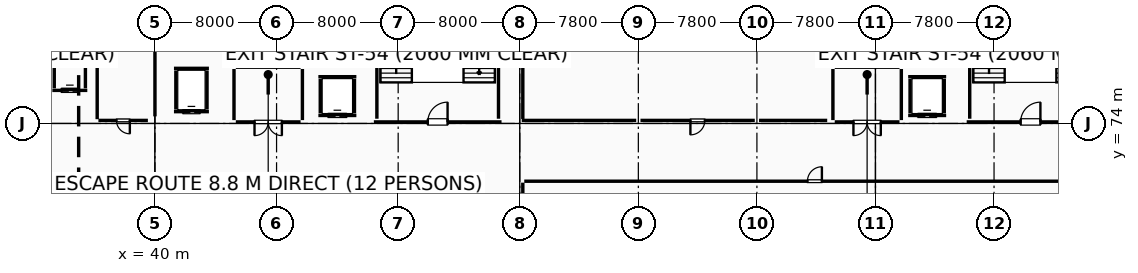
"""IFC4 building model, lengths in metres.
Left out: names, types, materials, properties, quantities, classifications, styles, units other than length and angle.
Written with IfcOpenShell. Run it as: python <this file> out.ifc"""

import sys

from ifc_helpers import new_model, si_unit, direction, frame, frame_2d, origin, origin_2d, place, context, subcontext, project, spatial, rectangle, i_section, extrude, element, fill, save


model = new_model("IFC4")
c1 = context("Model", 3, precision=1e-05, world=origin(), true_north=direction((0.0, 1.0)))
c2 = subcontext(c1, "Body", "Model", "MODEL_VIEW")
j1 = project(units=[si_unit("LENGTHUNIT", "METRE"), si_unit("PLANEANGLEUNIT", "RADIAN")], contexts=[c1])
p1 = place(None, origin())
s1 = spatial("IfcSite", under=j1, at=p1, CompositionType="ELEMENT")
p2 = place(p1, origin())
s2 = spatial("IfcBuilding", under=s1, at=p2, CompositionType="ELEMENT")
p3 = place(p2, origin())
s3 = spatial("IfcBuildingStorey", under=s2, at=p3, CompositionType="ELEMENT", Elevation=0.0)
p4 = place(p3, frame((40.0, 74.0, 0.0), z_axis=(0.0, 0.0, 1.0), x_axis=(1.0, 0.0, 0.0)))
e1 = element("IfcColumn", 1, at=p4, inside=s3, PredefinedType="COLUMN", context=c2, shape_type="SweptSolid", body=[
    extrude(rectangle(XDim=0.9, YDim=0.9, at=origin_2d()), origin(), (0.0, 0.0, 1.0), 5.4),
])
for number, where, z_axis, x_axis in (
    (2, (64.0, 74.0, 0.0), (0.0, 0.0, 1.0), (1.0, 0.0, 0.0)),
    (3, (71.8, 74.0, 0.0), (0.0, 0.0, 1.0), (1.0, 0.0, 0.0)),
    (4, (79.6, 74.0, 0.0), (0.0, 0.0, 1.0), (1.0, 0.0, 0.0)),
):
    element("IfcColumn", number, at=place(p3, frame(where, z_axis=z_axis, x_axis=x_axis)), inside=s3, PredefinedType="COLUMN", context=c2, shape_type="SweptSolid", body=[
        extrude(i_section(OverallWidth=0.25, OverallDepth=0.45, WebThickness=0.011, FlangeThickness=0.014, FilletRadius=0.015, at=origin_2d()), origin(), (0.0, 0.0, 1.0), 5.4),
    ])
for number, where, z_axis, x_axis in (
    (5, (40.0, 69.8, 0.0), (0.0, 0.0, 1.0), (1.0, 0.0, 0.0)),
    (6, (54.0, 69.8, 0.0), (0.0, 0.0, 1.0), (1.0, 0.0, 0.0)),
):
    element("IfcColumn", number, at=place(p3, frame(where, z_axis=z_axis, x_axis=x_axis)), inside=s3, PredefinedType="COLUMN", context=c2, shape_type="SweptSolid", body=[
        extrude(i_section(OverallWidth=0.25, OverallDepth=0.35, WebThickness=0.01, FlangeThickness=0.012, FilletRadius=0.012, at=origin_2d()), origin(), (0.0, 0.0, 1.0), 5.4),
    ])
p5 = place(p3, frame((39.84, 69.617, 0.0), z_axis=(0.0, 0.0, 1.0), x_axis=(0.0, -1.0, 0.0)))
e7 = element("IfcWall", 7, at=p5, inside=s3, PredefinedType="STANDARD", context=c2, shape_type="SweptSolid", body=[
    extrude(rectangle(XDim=4.17, YDim=0.28, at=frame_2d((2.085, 0.0))), origin(), (0.0, 0.0, 1.0), 4.505),
])
p6 = place(p5, frame((0.667, 0.0, 0.95)))
e8 = element("IfcOpeningElement", 8, at=p6, cuts=e7, PredefinedType="OPENING", context=c2, shape_type="SweptSolid", body=[
    extrude(rectangle(XDim=2.4, YDim=1.5, at=frame_2d((1.2, 0.75))), frame((0.0, 0.15, 0.0), z_axis=(0.0, -1.0, 0.0), x_axis=(1.0, 0.0, 0.0)), (0.0, 0.0, 1.0), 0.3),
])
p7 = place(p3, frame((54.15, 65.883, 0.0), z_axis=(0.0, 0.0, 1.0), x_axis=(0.0, 1.0, 0.0)))
e9 = element("IfcWall", 9, at=p7, inside=s3, PredefinedType="ELEMENTEDWALL", context=c2, shape_type="SweptSolid", body=[
    extrude(rectangle(XDim=3.734, YDim=0.26, at=frame_2d((1.867, 0.0))), origin(), (0.0, 0.0, 1.0), 3.675),
])
p8 = place(p7, frame((1.417, 0.0, 0.95)))
e10 = element("IfcOpeningElement", 10, at=p8, cuts=e9, PredefinedType="OPENING", context=c2, shape_type="SweptSolid", body=[
    extrude(rectangle(XDim=0.9, YDim=1.8, at=frame_2d((0.45, 0.9))), frame((0.0, 0.14, 0.0), z_axis=(0.0, -1.0, 0.0), x_axis=(1.0, 0.0, 0.0)), (0.0, 0.0, 1.0), 0.28),
])
p9 = place(p3, frame((54.4, 74.1, 0.0), z_axis=(0.0, 0.0, 1.0), x_axis=(1.0, 0.0, 0.0)))
e11 = element("IfcWall", 11, at=p9, inside=s3, PredefinedType="SHEAR", context=c2, shape_type="SweptSolid", body=[
    extrude(rectangle(XDim=8.4, YDim=0.4, at=frame_2d((4.2, 0.0))), origin(), (0.0, 0.0, 1.0), 5.12),
])
p10 = place(p9, frame((3.55, 0.0, 0.0)))
e12 = element("IfcOpeningElement", 12, at=p10, cuts=e11, PredefinedType="OPENING", context=c2, shape_type="SweptSolid", body=[
    extrude(rectangle(XDim=1.3, YDim=2.15, at=frame_2d((0.65, 1.075))), frame((0.0, 0.21, 0.0), z_axis=(0.0, -1.0, 0.0), x_axis=(1.0, 0.0, 0.0)), (0.0, 0.0, 1.0), 0.42),
])
for number, where, z_axis, x_axis in (
    (13, (62.6, 74.31, 0.0), (0.0, 0.0, 1.0), (0.0, 1.0, 0.0)),
    (14, (54.6, 82.69, 0.0), (0.0, 0.0, 1.0), (0.0, -1.0, 0.0)),
):
    element("IfcWall", number, at=place(p3, frame(where, z_axis=z_axis, x_axis=x_axis)), inside=s3, PredefinedType="SHEAR", context=c2, shape_type="SweptSolid", body=[
        extrude(rectangle(XDim=8.38, YDim=0.4, at=frame_2d((4.19, 0.0))), origin(), (0.0, 0.0, 1.0), 5.12),
    ])
p11 = place(p3, frame((50.75, 74.525, 0.0), z_axis=(0.0, 0.0, 1.0), x_axis=(1.0, 0.0, 0.0)))
e15 = element("IfcWall", 15, at=p11, inside=s3, PredefinedType="STANDARD", context=c2, shape_type="SweptSolid", body=[
    extrude(rectangle(XDim=2.5, YDim=0.25, at=frame_2d((1.25, 0.0))), origin(), (0.0, 0.0, 1.0), 5.11),
])
p12 = place(p11, frame((0.65, 0.0, 0.0)))
e16 = element("IfcOpeningElement", 16, at=p12, cuts=e15, PredefinedType="OPENING", context=c2, shape_type="SweptSolid", body=[
    extrude(rectangle(XDim=1.2, YDim=2.05, at=frame_2d((0.6, 1.025))), frame((0.0, 0.135, 0.0), z_axis=(0.0, -1.0, 0.0), x_axis=(1.0, 0.0, 0.0)), (0.0, 0.0, 1.0), 0.27),
])
p13 = place(p3, frame((53.25, 77.075, 0.0), z_axis=(0.0, 0.0, 1.0), x_axis=(-1.0, 0.0, 0.0)))
e17 = element("IfcWall", 17, at=p13, inside=s3, PredefinedType="STANDARD", context=c2, shape_type="SweptSolid", body=[
    extrude(rectangle(XDim=2.5, YDim=0.25, at=frame_2d((1.25, 0.0))), origin(), (0.0, 0.0, 1.0), 5.11),
])
for number, where, z_axis, x_axis in (
    (18, (53.125, 74.66, 0.0), (0.0, 0.0, 1.0), (0.0, 1.0, 0.0)),
    (19, (50.875, 76.94, 0.0), (0.0, 0.0, 1.0), (0.0, -1.0, 0.0)),
):
    element("IfcWall", number, at=place(p3, frame(where, z_axis=z_axis, x_axis=x_axis)), inside=s3, PredefinedType="STANDARD", context=c2, shape_type="SweptSolid", body=[
        extrude(rectangle(XDim=2.28, YDim=0.25, at=frame_2d((1.14, 0.0))), origin(), (0.0, 0.0, 1.0), 5.11),
    ])
p14 = place(p3, frame((41.25, 74.775, 0.0), z_axis=(0.0, 0.0, 1.0), x_axis=(1.0, 0.0, 0.0)))
e20 = element("IfcWall", 20, at=p14, inside=s3, PredefinedType="STANDARD", context=c2, shape_type="SweptSolid", body=[
    extrude(rectangle(XDim=2.3, YDim=0.25, at=frame_2d((1.15, 0.0))), origin(), (0.0, 0.0, 1.0), 5.11),
])
p15 = place(p14, frame((0.6, 0.0, 0.0)))
e21 = element("IfcOpeningElement", 21, at=p15, cuts=e20, PredefinedType="OPENING", context=c2, shape_type="SweptSolid", body=[
    extrude(rectangle(XDim=1.1, YDim=2.15, at=frame_2d((0.55, 1.075))), frame((0.0, 0.135, 0.0), z_axis=(0.0, -1.0, 0.0), x_axis=(1.0, 0.0, 0.0)), (0.0, 0.0, 1.0), 0.27),
])
p16 = place(p3, frame((43.55, 77.625, 0.0), z_axis=(0.0, 0.0, 1.0), x_axis=(-1.0, 0.0, 0.0)))
e22 = element("IfcWall", 22, at=p16, inside=s3, PredefinedType="STANDARD", context=c2, shape_type="SweptSolid", body=[
    extrude(rectangle(XDim=2.3, YDim=0.25, at=frame_2d((1.15, 0.0))), origin(), (0.0, 0.0, 1.0), 5.11),
])
for number, where, z_axis, x_axis in (
    (23, (43.425, 74.91, 0.0), (0.0, 0.0, 1.0), (0.0, 1.0, 0.0)),
    (24, (41.375, 77.49, 0.0), (0.0, 0.0, 1.0), (0.0, -1.0, 0.0)),
):
    element("IfcWall", number, at=place(p3, frame(where, z_axis=z_axis, x_axis=x_axis)), inside=s3, PredefinedType="STANDARD", context=c2, shape_type="SweptSolid", body=[
        extrude(rectangle(XDim=2.58, YDim=0.25, at=frame_2d((1.29, 0.0))), origin(), (0.0, 0.0, 1.0), 5.11),
    ])
p17 = place(p3, frame((93.4, 74.1, 0.0), z_axis=(0.0, 0.0, 1.0), x_axis=(1.0, 0.0, 0.0)))
e25 = element("IfcWall", 25, at=p17, inside=s3, PredefinedType="SHEAR", context=c2, shape_type="SweptSolid", body=[
    extrude(rectangle(XDim=8.4, YDim=0.4, at=frame_2d((4.2, 0.0))), origin(), (0.0, 0.0, 1.0), 5.12),
])
p18 = place(p17, frame((3.55, 0.0, 0.0)))
e26 = element("IfcOpeningElement", 26, at=p18, cuts=e25, PredefinedType="OPENING", context=c2, shape_type="SweptSolid", body=[
    extrude(rectangle(XDim=1.3, YDim=2.15, at=frame_2d((0.65, 1.075))), frame((0.0, 0.21, 0.0), z_axis=(0.0, -1.0, 0.0), x_axis=(1.0, 0.0, 0.0)), (0.0, 0.0, 1.0), 0.42),
])
p19 = place(p3, frame((93.6, 82.69, 0.0), z_axis=(0.0, 0.0, 1.0), x_axis=(0.0, -1.0, 0.0)))
e27 = element("IfcWall", 27, at=p19, inside=s3, PredefinedType="SHEAR", context=c2, shape_type="SweptSolid", body=[
    extrude(rectangle(XDim=8.38, YDim=0.4, at=frame_2d((4.19, 0.0))), origin(), (0.0, 0.0, 1.0), 5.12),
])
p20 = place(p3, frame((89.55, 74.525, 0.0), z_axis=(0.0, 0.0, 1.0), x_axis=(1.0, 0.0, 0.0)))
e28 = element("IfcWall", 28, at=p20, inside=s3, PredefinedType="STANDARD", context=c2, shape_type="SweptSolid", body=[
    extrude(rectangle(XDim=2.5, YDim=0.25, at=frame_2d((1.25, 0.0))), origin(), (0.0, 0.0, 1.0), 5.11),
])
p21 = place(p20, frame((0.65, 0.0, 0.0)))
e29 = element("IfcOpeningElement", 29, at=p21, cuts=e28, PredefinedType="OPENING", context=c2, shape_type="SweptSolid", body=[
    extrude(rectangle(XDim=1.2, YDim=2.05, at=frame_2d((0.6, 1.025))), frame((0.0, 0.135, 0.0), z_axis=(0.0, -1.0, 0.0), x_axis=(1.0, 0.0, 0.0)), (0.0, 0.0, 1.0), 0.27),
])
p22 = place(p3, frame((92.05, 77.075, 0.0), z_axis=(0.0, 0.0, 1.0), x_axis=(-1.0, 0.0, 0.0)))
e30 = element("IfcWall", 30, at=p22, inside=s3, PredefinedType="STANDARD", context=c2, shape_type="SweptSolid", body=[
    extrude(rectangle(XDim=2.5, YDim=0.25, at=frame_2d((1.25, 0.0))), origin(), (0.0, 0.0, 1.0), 5.11),
])
for number, where, z_axis, x_axis in (
    (31, (91.925, 74.66, 0.0), (0.0, 0.0, 1.0), (0.0, 1.0, 0.0)),
    (32, (89.675, 76.94, 0.0), (0.0, 0.0, 1.0), (0.0, -1.0, 0.0)),
):
    element("IfcWall", number, at=place(p3, frame(where, z_axis=z_axis, x_axis=x_axis)), inside=s3, PredefinedType="STANDARD", context=c2, shape_type="SweptSolid", body=[
        extrude(rectangle(XDim=2.28, YDim=0.25, at=frame_2d((1.14, 0.0))), origin(), (0.0, 0.0, 1.0), 5.11),
    ])
p23 = place(p3, frame((85.65, 78.775, 0.0), z_axis=(0.0, 0.0, 1.0), x_axis=(1.0, 0.0, 0.0)))
e33 = element("IfcWall", 33, at=p23, inside=s3, PredefinedType="STANDARD", context=c2, shape_type="SweptSolid", body=[
    extrude(rectangle(XDim=2.3, YDim=0.25, at=frame_2d((1.15, 0.0))), origin(), (0.0, 0.0, 1.0), 5.11),
])
p24 = place(p3, frame((33.25, 76.175, 0.0), z_axis=(0.0, 0.0, 1.0), x_axis=(1.0, 0.0, 0.0)))
e34 = element("IfcWall", 34, at=p24, inside=s3, PredefinedType="STANDARD", context=c2, shape_type="SweptSolid", body=[
    extrude(rectangle(XDim=2.3, YDim=0.25, at=frame_2d((1.15, 0.0))), origin(), (0.0, 0.0, 1.0), 5.11),
])
p25 = place(p24, frame((0.6, 0.0, 0.0)))
e35 = element("IfcOpeningElement", 35, at=p25, cuts=e34, PredefinedType="OPENING", context=c2, shape_type="SweptSolid", body=[
    extrude(rectangle(XDim=1.1, YDim=2.15, at=frame_2d((0.55, 1.075))), frame((0.0, 0.135, 0.0), z_axis=(0.0, -1.0, 0.0), x_axis=(1.0, 0.0, 0.0)), (0.0, 0.0, 1.0), 0.27),
])
for number, where, z_axis, x_axis in (
    (36, (35.425, 76.31, 0.0), (0.0, 0.0, 1.0), (0.0, 1.0, 0.0)),
    (37, (33.375, 78.89, 0.0), (0.0, 0.0, 1.0), (0.0, -1.0, 0.0)),
):
    element("IfcWall", number, at=place(p3, frame(where, z_axis=z_axis, x_axis=x_axis)), inside=s3, PredefinedType="STANDARD", context=c2, shape_type="SweptSolid", body=[
        extrude(rectangle(XDim=2.58, YDim=0.25, at=frame_2d((1.29, 0.0))), origin(), (0.0, 0.0, 1.0), 5.11),
    ])
p26 = place(p3, frame((45.2, 74.22, 0.0), z_axis=(0.0, 0.0, 1.0), x_axis=(0.0, 1.0, 0.0)))
e38 = element("IfcWall", 38, at=p26, inside=s3, PredefinedType="PARTITIONING", context=c2, shape_type="SweptSolid", body=[
    extrude(rectangle(XDim=3.36, YDim=0.2, at=frame_2d((1.68, 0.0))), origin(), (0.0, 0.0, 1.0), 5.11),
])
p27 = place(p3, frame((45.32, 77.7, 0.0), z_axis=(0.0, 0.0, 1.0), x_axis=(1.0, 0.0, 0.0)))
e39 = element("IfcWall", 39, at=p27, inside=s3, PredefinedType="PARTITIONING", context=c2, shape_type="SweptSolid", body=[
    extrude(rectangle(XDim=4.26, YDim=0.2, at=frame_2d((2.13, 0.0))), origin(), (0.0, 0.0, 1.0), 5.11),
])
p28 = place(p3, frame((49.7, 77.58, 0.0), z_axis=(0.0, 0.0, 1.0), x_axis=(0.0, -1.0, 0.0)))
e40 = element("IfcWall", 40, at=p28, inside=s3, PredefinedType="PARTITIONING", context=c2, shape_type="SweptSolid", body=[
    extrude(rectangle(XDim=3.36, YDim=0.2, at=frame_2d((1.68, 0.0))), origin(), (0.0, 0.0, 1.0), 5.11),
])
p29 = place(p3, frame((49.58, 74.1, 0.0), z_axis=(0.0, 0.0, 1.0), x_axis=(-1.0, 0.0, 0.0)))
e41 = element("IfcWall", 41, at=p29, inside=s3, PredefinedType="PARTITIONING", context=c2, shape_type="SweptSolid", body=[
    extrude(rectangle(XDim=4.26, YDim=0.2, at=frame_2d((2.13, 0.0))), origin(), (0.0, 0.0, 1.0), 5.11),
])
p30 = place(p29, frame((1.23, 0.0, 0.0)))
e42 = element("IfcOpeningElement", 42, at=p30, cuts=e41, PredefinedType="OPENING", context=c2, shape_type="SweptSolid", body=[
    extrude(rectangle(XDim=1.8, YDim=2.15, at=frame_2d((0.9, 1.075))), frame((0.0, 0.11, 0.0), z_axis=(0.0, -1.0, 0.0), x_axis=(1.0, 0.0, 0.0)), (0.0, 0.0, 1.0), 0.22),
])
p31 = place(p3, frame((84.6, 74.22, 0.0), z_axis=(0.0, 0.0, 1.0), x_axis=(0.0, 1.0, 0.0)))
e43 = element("IfcWall", 43, at=p31, inside=s3, PredefinedType="PARTITIONING", context=c2, shape_type="SweptSolid", body=[
    extrude(rectangle(XDim=3.36, YDim=0.2, at=frame_2d((1.68, 0.0))), origin(), (0.0, 0.0, 1.0), 5.11),
])
p32 = place(p3, frame((84.72, 77.7, 0.0), z_axis=(0.0, 0.0, 1.0), x_axis=(1.0, 0.0, 0.0)))
e44 = element("IfcWall", 44, at=p32, inside=s3, PredefinedType="PARTITIONING", context=c2, shape_type="SweptSolid", body=[
    extrude(rectangle(XDim=4.26, YDim=0.2, at=frame_2d((2.13, 0.0))), origin(), (0.0, 0.0, 1.0), 5.11),
])
p33 = place(p3, frame((89.1, 77.58, 0.0), z_axis=(0.0, 0.0, 1.0), x_axis=(0.0, -1.0, 0.0)))
e45 = element("IfcWall", 45, at=p33, inside=s3, PredefinedType="PARTITIONING", context=c2, shape_type="SweptSolid", body=[
    extrude(rectangle(XDim=3.36, YDim=0.2, at=frame_2d((1.68, 0.0))), origin(), (0.0, 0.0, 1.0), 5.11),
])
p34 = place(p3, frame((88.98, 74.1, 0.0), z_axis=(0.0, 0.0, 1.0), x_axis=(-1.0, 0.0, 0.0)))
e46 = element("IfcWall", 46, at=p34, inside=s3, PredefinedType="PARTITIONING", context=c2, shape_type="SweptSolid", body=[
    extrude(rectangle(XDim=4.26, YDim=0.2, at=frame_2d((2.13, 0.0))), origin(), (0.0, 0.0, 1.0), 5.11),
])
p35 = place(p34, frame((1.23, 0.0, 0.0)))
e47 = element("IfcOpeningElement", 47, at=p35, cuts=e46, PredefinedType="OPENING", context=c2, shape_type="SweptSolid", body=[
    extrude(rectangle(XDim=1.8, YDim=2.15, at=frame_2d((0.9, 1.075))), frame((0.0, 0.11, 0.0), z_axis=(0.0, -1.0, 0.0), x_axis=(1.0, 0.0, 0.0)), (0.0, 0.0, 1.0), 0.22),
])
p36 = place(p3, frame((64.295, 70.2, 0.0), z_axis=(0.0, 0.0, 1.0), x_axis=(1.0, 0.0, 0.0)))
e48 = element("IfcWall", 48, at=p36, inside=s3, PredefinedType="PARTITIONING", context=c2, shape_type="SweptSolid", body=[
    extrude(rectangle(XDim=38.401, YDim=0.15, at=frame_2d((19.201, 0.0))), origin(), (0.0, 0.0, 1.0), 5.11),
])
p37 = place(p36, frame((18.63, 0.0, 0.0)))
e49 = element("IfcOpeningElement", 49, at=p37, cuts=e48, PredefinedType="OPENING", context=c2, shape_type="SweptSolid", body=[
    extrude(rectangle(XDim=0.95, YDim=2.15, at=frame_2d((0.475, 1.075))), frame((0.0, 0.085, 0.0), z_axis=(0.0, -1.0, 0.0), x_axis=(1.0, 0.0, 0.0)), (0.0, 0.0, 1.0), 0.17),
])
p38 = place(p3, frame((64.2, 65.24, 0.0), z_axis=(0.0, 0.0, 1.0), x_axis=(0.0, 1.0, 0.0)))
e50 = element("IfcWall", 50, at=p38, inside=s3, PredefinedType="PARTITIONING", context=c2, shape_type="SweptSolid", body=[
    extrude(rectangle(XDim=4.865, YDim=0.15, at=frame_2d((2.433, 0.0))), origin(), (0.0, 0.0, 1.0), 4.65),
])
p39 = place(p3, frame((64.2, 74.295, 0.0), z_axis=(0.0, 0.0, 1.0), x_axis=(0.0, 1.0, 0.0)))
e51 = element("IfcWall", 51, at=p39, inside=s3, PredefinedType="PARTITIONING", context=c2, shape_type="SweptSolid", body=[
    extrude(rectangle(XDim=8.476, YDim=0.15, at=frame_2d((4.238, 0.0))), origin(), (0.0, 0.0, 1.0), 4.1),
])
p40 = place(p3, frame((84.225, 74.2, 0.0), z_axis=(0.0, 0.0, 1.0), x_axis=(-1.0, 0.0, 0.0)))
e52 = element("IfcWall", 52, at=p40, inside=s3, PredefinedType="PARTITIONING", context=c2, shape_type="SweptSolid", body=[
    extrude(rectangle(XDim=4.485, YDim=0.15, at=frame_2d((2.243, 0.0))), origin(), (0.0, 0.0, 1.0), 5.11),
])
p41 = place(p3, frame((79.46, 74.2, 0.0), z_axis=(0.0, 0.0, 1.0), x_axis=(-1.0, 0.0, 0.0)))
e53 = element("IfcWall", 53, at=p41, inside=s3, PredefinedType="PARTITIONING", context=c2, shape_type="SweptSolid", body=[
    extrude(rectangle(XDim=7.52, YDim=0.15, at=frame_2d((3.76, 0.0))), origin(), (0.0, 0.0, 1.0), 4.75),
])
p42 = place(p41, frame((3.285, 0.0, 0.0)))
e54 = element("IfcOpeningElement", 54, at=p42, cuts=e53, PredefinedType="OPENING", context=c2, shape_type="SweptSolid", body=[
    extrude(rectangle(XDim=0.95, YDim=2.15, at=frame_2d((0.475, 1.075))), frame((0.0, 0.085, 0.0), z_axis=(0.0, -1.0, 0.0), x_axis=(1.0, 0.0, 0.0)), (0.0, 0.0, 1.0), 0.17),
])
p43 = place(p3, frame((71.66, 74.2, 0.0), z_axis=(0.0, 0.0, 1.0), x_axis=(-1.0, 0.0, 0.0)))
e55 = element("IfcWall", 55, at=p43, inside=s3, PredefinedType="PARTITIONING", context=c2, shape_type="SweptSolid", body=[
    extrude(rectangle(XDim=7.531, YDim=0.15, at=frame_2d((3.766, 0.0))), origin(), (0.0, 0.0, 1.0), 4.7),
])
p44 = place(p3, frame((40.0, 82.671, 0.0), z_axis=(0.0, 0.0, 1.0), x_axis=(0.0, -1.0, 0.0)))
e56 = element("IfcWall", 56, at=p44, inside=s3, PredefinedType="PARTITIONING", context=c2, shape_type="SweptSolid", body=[
    extrude(rectangle(XDim=8.206, YDim=0.12, at=frame_2d((4.103, 0.0))), origin(), (0.0, 0.0, 1.0), 4.6),
])
p45 = place(p3, frame((39.535, 74.2, 0.0), z_axis=(0.0, 0.0, 1.0), x_axis=(-1.0, 0.0, 0.0)))
e57 = element("IfcWall", 57, at=p45, inside=s3, PredefinedType="PARTITIONING", context=c2, shape_type="SweptSolid", body=[
    extrude(rectangle(XDim=3.255, YDim=0.12, at=frame_2d((1.627, 0.0))), origin(), (0.0, 0.0, 1.0), 5.11),
])
p46 = place(p45, frame((1.187, 0.0, 0.0)))
e58 = element("IfcOpeningElement", 58, at=p46, cuts=e57, PredefinedType="OPENING", context=c2, shape_type="SweptSolid", body=[
    extrude(rectangle(XDim=0.88, YDim=2.1, at=frame_2d((0.44, 1.05))), frame((0.0, 0.07, 0.0), z_axis=(0.0, -1.0, 0.0), x_axis=(1.0, 0.0, 0.0)), (0.0, 0.0, 1.0), 0.14),
])
p47 = place(p3, frame((36.2, 74.28, 0.0), z_axis=(0.0, 0.0, 1.0), x_axis=(0.0, 1.0, 0.0)))
e59 = element("IfcWall", 59, at=p47, inside=s3, PredefinedType="PARTITIONING", context=c2, shape_type="SweptSolid", body=[
    extrude(rectangle(XDim=8.24, YDim=0.12, at=frame_2d((4.12, 0.0))), origin(), (0.0, 0.0, 1.0), 5.11),
])
p48 = place(p10, origin())
e60 = element("IfcDoor", 60, at=p48, inside=s3, OperationType="SINGLE_SWING_RIGHT", PredefinedType="DOOR", context=c2, shape_type="SweptSolid", body=[
    extrude(rectangle(XDim=1.3, YDim=2.15, at=frame_2d((0.65, 1.075))), frame((0.0, 0.025, 0.0), z_axis=(0.0, -1.0, 0.0), x_axis=(1.0, 0.0, 0.0)), (0.0, 0.0, 1.0), 0.05),
])
fill(e12, e60)
p49 = place(p12, origin())
e61 = element("IfcDoor", 61, at=p49, inside=s3, OperationType="DOUBLE_DOOR_SLIDING", PredefinedType="DOOR", context=c2, shape_type="SweptSolid", body=[
    extrude(rectangle(XDim=1.2, YDim=2.05, at=frame_2d((0.6, 1.025))), frame((0.0, 0.025, 0.0), z_axis=(0.0, -1.0, 0.0), x_axis=(1.0, 0.0, 0.0)), (0.0, 0.0, 1.0), 0.05),
])
fill(e16, e61)
p50 = place(p15, origin())
e62 = element("IfcDoor", 62, at=p50, inside=s3, OperationType="DOUBLE_DOOR_SLIDING", PredefinedType="DOOR", context=c2, shape_type="SweptSolid", body=[
    extrude(rectangle(XDim=1.1, YDim=2.15, at=frame_2d((0.55, 1.075))), frame((0.0, 0.025, 0.0), z_axis=(0.0, -1.0, 0.0), x_axis=(1.0, 0.0, 0.0)), (0.0, 0.0, 1.0), 0.05),
])
fill(e21, e62)
p51 = place(p18, origin())
e63 = element("IfcDoor", 63, at=p51, inside=s3, OperationType="SINGLE_SWING_RIGHT", PredefinedType="DOOR", context=c2, shape_type="SweptSolid", body=[
    extrude(rectangle(XDim=1.3, YDim=2.15, at=frame_2d((0.65, 1.075))), frame((0.0, 0.025, 0.0), z_axis=(0.0, -1.0, 0.0), x_axis=(1.0, 0.0, 0.0)), (0.0, 0.0, 1.0), 0.05),
])
fill(e26, e63)
p52 = place(p21, origin())
e64 = element("IfcDoor", 64, at=p52, inside=s3, OperationType="DOUBLE_DOOR_SLIDING", PredefinedType="DOOR", context=c2, shape_type="SweptSolid", body=[
    extrude(rectangle(XDim=1.2, YDim=2.05, at=frame_2d((0.6, 1.025))), frame((0.0, 0.025, 0.0), z_axis=(0.0, -1.0, 0.0), x_axis=(1.0, 0.0, 0.0)), (0.0, 0.0, 1.0), 0.05),
])
fill(e29, e64)
p53 = place(p25, origin())
e65 = element("IfcDoor", 65, at=p53, inside=s3, OperationType="DOUBLE_DOOR_SLIDING", PredefinedType="DOOR", context=c2, shape_type="SweptSolid", body=[
    extrude(rectangle(XDim=1.1, YDim=2.15, at=frame_2d((0.55, 1.075))), frame((0.0, 0.025, 0.0), z_axis=(0.0, -1.0, 0.0), x_axis=(1.0, 0.0, 0.0)), (0.0, 0.0, 1.0), 0.05),
])
fill(e35, e65)
p54 = place(p30, origin())
e66 = element("IfcDoor", 66, at=p54, inside=s3, OperationType="DOUBLE_DOOR_SINGLE_SWING", PredefinedType="DOOR", context=c2, shape_type="SweptSolid", body=[
    extrude(rectangle(XDim=1.8, YDim=2.15, at=frame_2d((0.9, 1.075))), frame((0.0, 0.025, 0.0), z_axis=(0.0, -1.0, 0.0), x_axis=(1.0, 0.0, 0.0)), (0.0, 0.0, 1.0), 0.05),
])
fill(e42, e66)
p55 = place(p35, origin())
e67 = element("IfcDoor", 67, at=p55, inside=s3, OperationType="DOUBLE_DOOR_SINGLE_SWING", PredefinedType="DOOR", context=c2, shape_type="SweptSolid", body=[
    extrude(rectangle(XDim=1.8, YDim=2.15, at=frame_2d((0.9, 1.075))), frame((0.0, 0.025, 0.0), z_axis=(0.0, -1.0, 0.0), x_axis=(1.0, 0.0, 0.0)), (0.0, 0.0, 1.0), 0.05),
])
fill(e47, e67)
p56 = place(p37, origin())
e68 = element("IfcDoor", 68, at=p56, inside=s3, OperationType="SINGLE_SWING_RIGHT", PredefinedType="DOOR", context=c2, shape_type="SweptSolid", body=[
    extrude(rectangle(XDim=0.95, YDim=2.15, at=frame_2d((0.475, 1.075))), frame((0.0, 0.025, 0.0), z_axis=(0.0, -1.0, 0.0), x_axis=(1.0, 0.0, 0.0)), (0.0, 0.0, 1.0), 0.05),
])
fill(e49, e68)
p57 = place(p42, origin())
e69 = element("IfcDoor", 69, at=p57, inside=s3, OperationType="SINGLE_SWING_RIGHT", PredefinedType="DOOR", context=c2, shape_type="SweptSolid", body=[
    extrude(rectangle(XDim=0.95, YDim=2.15, at=frame_2d((0.475, 1.075))), frame((0.0, 0.025, 0.0), z_axis=(0.0, -1.0, 0.0), x_axis=(1.0, 0.0, 0.0)), (0.0, 0.0, 1.0), 0.05),
])
fill(e54, e69)
p58 = place(p46, origin())
e70 = element("IfcDoor", 70, at=p58, inside=s3, OperationType="SINGLE_SWING_LEFT", PredefinedType="DOOR", context=c2, shape_type="SweptSolid", body=[
    extrude(rectangle(XDim=0.88, YDim=2.1, at=frame_2d((0.44, 1.05))), frame((0.0, 0.025, 0.0), z_axis=(0.0, -1.0, 0.0), x_axis=(1.0, 0.0, 0.0)), (0.0, 0.0, 1.0), 0.05),
])
fill(e58, e70)
save(model, sys.argv[1])
